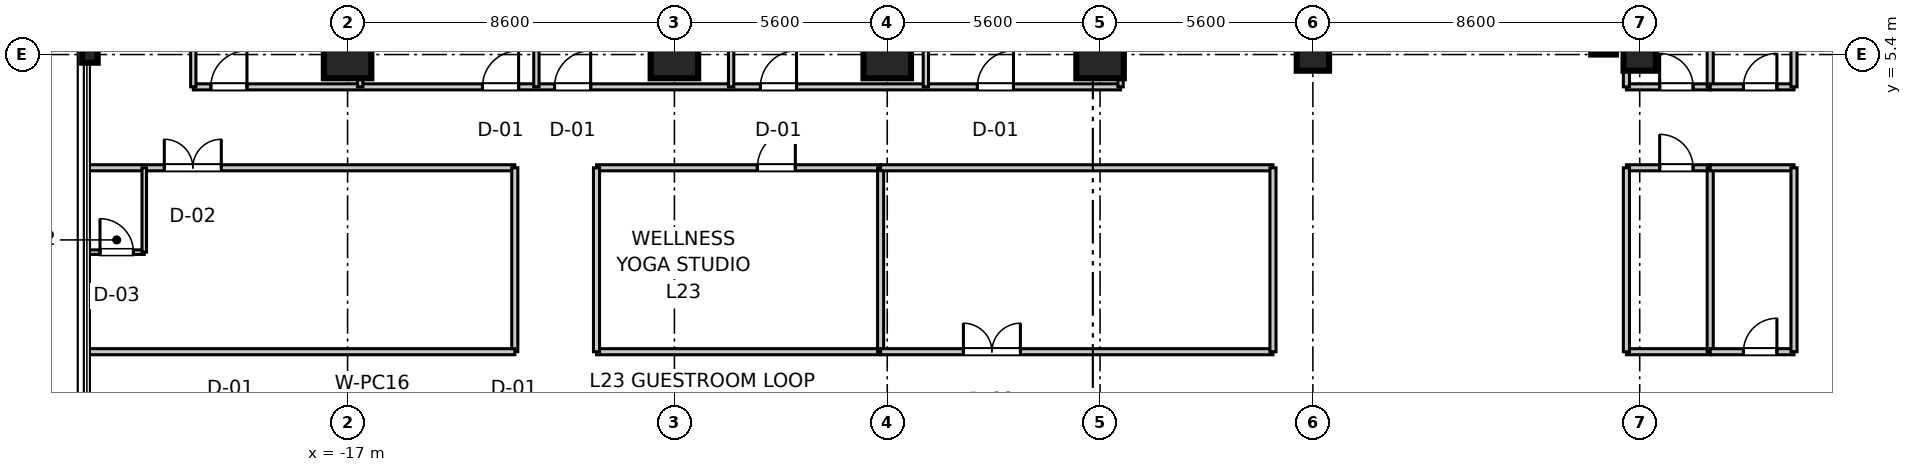
"""IFC4 building model, lengths in metres.
Left out: names, types, materials, properties, quantities, classifications, styles, units other than length and angle.
Written with IfcOpenShell. Run it as: python <this file> out.ifc"""

import sys

from ifc_helpers import new_model, si_unit, direction, frame, frame_2d, origin, origin_2d, place, context, subcontext, project, spatial, rectangle, i_section, extrude, source, transform, mapped, element, fill, save


model = new_model("IFC4")
c1 = context("Model", 3, precision=1e-05, world=origin(), true_north=direction((0.0, 1.0)))
c2 = subcontext(c1, "Body", "Model", "MODEL_VIEW")
j1 = project(units=[si_unit("LENGTHUNIT", "METRE"), si_unit("PLANEANGLEUNIT", "RADIAN")], contexts=[c1])
p1 = place(None, origin())
s1 = spatial("IfcSite", under=j1, at=p1, CompositionType="ELEMENT")
p2 = place(p1, origin())
s2 = spatial("IfcBuilding", under=s1, at=p2, CompositionType="ELEMENT")
p3 = place(p2, frame((0.0, 0.0, 95.6)))
s3 = spatial("IfcBuildingStorey", under=s2, at=p3, CompositionType="ELEMENT", Elevation=95.6)
m1 = source(origin(), c2, "Body", "SweptSolid", [
    extrude(rectangle(XDim=1.25, YDim=1.25, at=origin_2d()), origin(), (0.0, 0.0, 1.0), 3.605),
])
for number, where, z_axis, x_axis in (
    (1, (-17.0, 5.4, 0.0), (0.0, 0.0, 1.0), (1.0, 0.0, 0.0)),
    (2, (-8.4, 5.4, 0.0), (0.0, 0.0, 1.0), (1.0, 0.0, 0.0)),
    (3, (-2.8, 5.4, 0.0), (0.0, 0.0, 1.0), (1.0, 0.0, 0.0)),
    (4, (2.8, 5.4, 0.0), (0.0, 0.0, 1.0), (1.0, 0.0, 0.0)),
):
    element("IfcColumn", number, at=place(p3, frame(where, z_axis=z_axis, x_axis=x_axis)), inside=s3, PredefinedType="COLUMN", context=c2, shape_type="MappedRepresentation", body=[
        mapped(m1, transform((0.0, 0.0, 0.0), scale=1.0)),
    ])
m2 = source(origin(), c2, "Body", "SweptSolid", [
    extrude(rectangle(XDim=0.85, YDim=0.85, at=origin_2d()), origin(), (0.0, 0.0, 1.0), 3.605),
])
for number, where, z_axis, x_axis in (
    (5, (8.4, 5.4, 0.0), (0.0, 0.0, 1.0), (1.0, 0.0, 0.0)),
    (6, (17.0, 5.4, 0.0), (0.0, 0.0, 1.0), (1.0, 0.0, 0.0)),
):
    element("IfcColumn", number, at=place(p3, frame(where, z_axis=z_axis, x_axis=x_axis)), inside=s3, PredefinedType="PILASTER", context=c2, shape_type="MappedRepresentation", body=[
        mapped(m2, transform((0.0, 0.0, 0.0), scale=1.0)),
    ])
m3 = source(origin(), c2, "Body", "SweptSolid", [
    extrude(i_section(OverallWidth=0.409, OverallDepth=0.43, WebThickness=0.021, FlangeThickness=0.034, at=origin_2d()), origin(), (0.0, 0.0, 1.0), 3.605),
])
p4 = place(p3, frame((-23.78, 5.4, 0.0), z_axis=(0.0, 0.0, 1.0), x_axis=(1.0, 0.0, 0.0)))
e7 = element("IfcColumn", 7, at=p4, inside=s3, PredefinedType="COLUMN", context=c2, shape_type="MappedRepresentation", body=[
    mapped(m3, transform((0.0, 0.0, 0.0), scale=1.0)),
])
m4 = source(origin(), c2, "Body", "SweptSolid", [
    extrude(rectangle(XDim=11.6, YDim=0.65, at=frame_2d((5.8, 0.0))), origin(), (0.0, 0.0, 1.0), 3.38),
])
p5 = place(p3, frame((16.05, 5.4, 0.0), z_axis=(0.0, 0.0, 1.0), x_axis=(0.0, 1.0, 0.0)))
e8 = element("IfcWall", 8, at=p5, inside=s3, PredefinedType="SHEAR", context=c2, shape_type="MappedRepresentation", body=[
    mapped(m4, transform((0.0, 0.0, 0.0), scale=1.0)),
])
m5 = source(origin(), c2, "Body", "SweptSolid", [
    extrude(rectangle(XDim=2.205, YDim=0.16, at=frame_2d((1.103, 0.0))), origin(), (0.0, 0.0, 1.0), 2.72),
])
p6 = place(p3, frame((16.65, 4.55, 0.0), z_axis=(0.0, 0.0, 1.0), x_axis=(1.0, 0.0, 0.0)))
e9 = element("IfcWall", 9, at=p6, inside=s3, PredefinedType="PARTITIONING", context=c2, shape_type="MappedRepresentation", body=[
    mapped(m5, transform((0.0, 0.0, 0.0), scale=1.0)),
])
p7 = place(p6, frame((0.875, 0.0, 0.0)))
e10 = element("IfcOpeningElement", 10, at=p7, cuts=e9, PredefinedType="OPENING", context=c2, shape_type="SweptSolid", body=[
    extrude(rectangle(XDim=0.88, YDim=2.1, at=frame_2d((0.44, 1.05))), frame((0.0, 0.09, 0.0), z_axis=(0.0, -1.0, 0.0), x_axis=(1.0, 0.0, 0.0)), (0.0, 0.0, 1.0), 0.18),
])
m6 = source(origin(), c2, "Body", "SweptSolid", [
    extrude(rectangle(XDim=19.25, YDim=0.16, at=frame_2d((9.625, 0.0))), origin(), (0.0, 0.0, 1.0), 2.72),
])
for number, where, z_axis, x_axis in (
    (11, (16.65, 4.55, 0.0), (0.0, 0.0, 1.0), (0.0, 1.0, 0.0)),
    (12, (18.855, 4.55, 0.0), (0.0, 0.0, 1.0), (0.0, 1.0, 0.0)),
):
    element("IfcWall", number, at=place(p3, frame(where, z_axis=z_axis, x_axis=x_axis)), inside=s3, PredefinedType="PARTITIONING", context=c2, shape_type="MappedRepresentation", body=[
        mapped(m6, transform((0.0, 0.0, 0.0), scale=1.0)),
    ])
p8 = place(p3, frame((18.855, 4.55, 0.0), z_axis=(0.0, 0.0, 1.0), x_axis=(1.0, 0.0, 0.0)))
e13 = element("IfcWall", 13, at=p8, inside=s3, PredefinedType="PARTITIONING", context=c2, shape_type="MappedRepresentation", body=[
    mapped(m5, transform((0.0, 0.0, 0.0), scale=1.0)),
])
p9 = place(p8, frame((0.875, 0.0, 0.0)))
e14 = element("IfcOpeningElement", 14, at=p9, cuts=e13, PredefinedType="OPENING", context=c2, shape_type="SweptSolid", body=[
    extrude(rectangle(XDim=0.88, YDim=2.1, at=frame_2d((0.44, 1.05))), frame((0.0, 0.09, 0.0), z_axis=(0.0, -1.0, 0.0), x_axis=(1.0, 0.0, 0.0)), (0.0, 0.0, 1.0), 0.18),
])
m7 = source(origin(), c2, "Body", "SweptSolid", [
    extrude(rectangle(XDim=17.83, YDim=0.16, at=frame_2d((8.915, 0.0))), origin(), (0.0, 0.0, 1.0), 2.72),
])
p10 = place(p3, frame((21.06, 4.55, 0.0), z_axis=(0.0, 0.0, 1.0), x_axis=(0.0, 1.0, 0.0)))
e15 = element("IfcWall", 15, at=p10, inside=s3, PredefinedType="PARTITIONING", context=c2, shape_type="MappedRepresentation", body=[
    mapped(m7, transform((0.0, 0.0, 0.0), scale=1.0)),
])
m8 = source(origin(), c2, "Body", "SweptSolid", [
    extrude(rectangle(XDim=24.4, YDim=0.16, at=frame_2d((12.2, 0.0))), origin(), (0.0, 0.0, 1.0), 2.72),
])
p11 = place(p3, frame((-21.06, 4.55, 0.0), z_axis=(0.0, 0.0, 1.0), x_axis=(1.0, 0.0, 0.0)))
e16 = element("IfcWall", 16, at=p11, inside=s3, PredefinedType="PARTITIONING", context=c2, shape_type="MappedRepresentation", body=[
    mapped(m8, transform((0.0, 0.0, 0.0), scale=1.0)),
])
p12 = place(p11, frame((0.462, 0.0, 0.0)))
e17 = element("IfcOpeningElement", 17, at=p12, cuts=e16, PredefinedType="OPENING", context=c2, shape_type="SweptSolid", body=[
    extrude(rectangle(XDim=0.95, YDim=2.1, at=frame_2d((0.475, 1.05))), frame((0.0, 0.09, 0.0), z_axis=(0.0, -1.0, 0.0), x_axis=(1.0, 0.0, 0.0)), (0.0, 0.0, 1.0), 0.18),
])
p13 = place(p11, frame((7.61, 0.0, 0.0)))
e18 = element("IfcOpeningElement", 18, at=p13, cuts=e16, PredefinedType="OPENING", context=c2, shape_type="SweptSolid", body=[
    extrude(rectangle(XDim=0.95, YDim=2.1, at=frame_2d((0.475, 1.05))), frame((0.0, 0.09, 0.0), z_axis=(0.0, -1.0, 0.0), x_axis=(1.0, 0.0, 0.0)), (0.0, 0.0, 1.0), 0.18),
])
p14 = place(p11, frame((9.506, 0.0, 0.0)))
e19 = element("IfcOpeningElement", 19, at=p14, cuts=e16, PredefinedType="OPENING", context=c2, shape_type="SweptSolid", body=[
    extrude(rectangle(XDim=0.95, YDim=2.1, at=frame_2d((0.475, 1.05))), frame((0.0, 0.09, 0.0), z_axis=(0.0, -1.0, 0.0), x_axis=(1.0, 0.0, 0.0)), (0.0, 0.0, 1.0), 0.18),
])
p15 = place(p11, frame((14.923, 0.0, 0.0)))
e20 = element("IfcOpeningElement", 20, at=p15, cuts=e16, PredefinedType="OPENING", context=c2, shape_type="SweptSolid", body=[
    extrude(rectangle(XDim=0.95, YDim=2.1, at=frame_2d((0.475, 1.05))), frame((0.0, 0.09, 0.0), z_axis=(0.0, -1.0, 0.0), x_axis=(1.0, 0.0, 0.0)), (0.0, 0.0, 1.0), 0.18),
])
p16 = place(p11, frame((20.632, 0.0, 0.0)))
e21 = element("IfcOpeningElement", 21, at=p16, cuts=e16, PredefinedType="OPENING", context=c2, shape_type="SweptSolid", body=[
    extrude(rectangle(XDim=0.95, YDim=2.1, at=frame_2d((0.475, 1.05))), frame((0.0, 0.09, 0.0), z_axis=(0.0, -1.0, 0.0), x_axis=(1.0, 0.0, 0.0)), (0.0, 0.0, 1.0), 0.18),
])
m9 = source(origin(), c2, "Body", "SweptSolid", [
    extrude(rectangle(XDim=17.83, YDim=0.14, at=frame_2d((8.915, 0.0))), origin(), (0.0, 0.0, 1.0), 2.72),
])
p17 = place(p3, frame((-21.06, 4.55, 0.0), z_axis=(0.0, 0.0, 1.0), x_axis=(0.0, 1.0, 0.0)))
e22 = element("IfcWall", 22, at=p17, inside=s3, PredefinedType="PARTITIONING", context=c2, shape_type="MappedRepresentation", body=[
    mapped(m9, transform((0.0, 0.0, 0.0), scale=1.0)),
])
m10 = source(origin(), c2, "Body", "SweptSolid", [
    extrude(rectangle(XDim=19.25, YDim=0.14, at=frame_2d((9.625, 0.0))), origin(), (0.0, 0.0, 1.0), 2.72),
])
for number, where, z_axis, x_axis in (
    (23, (3.34, 4.55, 0.0), (0.0, 0.0, 1.0), (0.0, 1.0, 0.0)),
    (24, (-16.668, 4.55, 0.0), (0.0, 0.0, 1.0), (0.0, 1.0, 0.0)),
    (25, (-12.032, 4.55, 0.0), (0.0, 0.0, 1.0), (0.0, 1.0, 0.0)),
    (26, (-6.908, 4.55, 0.0), (0.0, 0.0, 1.0), (0.0, 1.0, 0.0)),
    (27, (-1.784, 4.55, 0.0), (0.0, 0.0, 1.0), (0.0, 1.0, 0.0)),
):
    element("IfcWall", number, at=place(p3, frame(where, z_axis=z_axis, x_axis=x_axis)), inside=s3, PredefinedType="PARTITIONING", context=c2, shape_type="MappedRepresentation", body=[
        mapped(m10, transform((0.0, 0.0, 0.0), scale=1.0)),
    ])
m11 = source(origin(), c2, "Body", "SweptSolid", [
    extrude(rectangle(XDim=11.2, YDim=0.16, at=frame_2d((5.6, 0.0))), origin(), (0.0, 0.0, 1.0), 2.72),
])
p18 = place(p3, frame((-23.8, 2.42, 0.0), z_axis=(0.0, 0.0, 1.0), x_axis=(1.0, 0.0, 0.0)))
e28 = element("IfcWall", 28, at=p18, inside=s3, PredefinedType="PARTITIONING", context=c2, shape_type="MappedRepresentation", body=[
    mapped(m11, transform((0.0, 0.0, 0.0), scale=1.0)),
])
p19 = place(p18, frame((1.977, 0.0, 0.0)))
e29 = element("IfcOpeningElement", 29, at=p19, cuts=e28, PredefinedType="OPENING", context=c2, shape_type="SweptSolid", body=[
    extrude(rectangle(XDim=1.5, YDim=2.15, at=frame_2d((0.75, 1.075))), frame((0.0, 0.09, 0.0), z_axis=(0.0, -1.0, 0.0), x_axis=(1.0, 0.0, 0.0)), (0.0, 0.0, 1.0), 0.18),
])
m12 = source(origin(), c2, "Body", "SweptSolid", [
    extrude(rectangle(XDim=4.84, YDim=0.16, at=frame_2d((2.42, 0.0))), origin(), (0.0, 0.0, 1.0), 2.72),
])
p20 = place(p3, frame((-12.6, -2.42, 0.0), z_axis=(0.0, 0.0, 1.0), x_axis=(0.0, 1.0, 0.0)))
e30 = element("IfcWall", 30, at=p20, inside=s3, PredefinedType="PARTITIONING", context=c2, shape_type="MappedRepresentation", body=[
    mapped(m12, transform((0.0, 0.0, 0.0), scale=1.0)),
])
p21 = place(p3, frame((-23.8, -2.42, 0.0), z_axis=(0.0, 0.0, 1.0), x_axis=(1.0, 0.0, 0.0)))
e31 = element("IfcWall", 31, at=p21, inside=s3, PredefinedType="PARTITIONING", context=c2, shape_type="MappedRepresentation", body=[
    mapped(m11, transform((0.0, 0.0, 0.0), scale=1.0)),
])
m13 = source(origin(), c2, "Body", "SweptSolid", [
    extrude(rectangle(XDim=1.45, YDim=0.12, at=frame_2d((0.725, 0.0))), origin(), (0.0, 0.0, 1.0), 2.72),
])
p22 = place(p3, frame((-23.8, 0.2, 0.0), z_axis=(0.0, 0.0, 1.0), x_axis=(1.0, 0.0, 0.0)))
e32 = element("IfcWall", 32, at=p22, inside=s3, PredefinedType="PARTITIONING", context=c2, shape_type="MappedRepresentation", body=[
    mapped(m13, transform((0.0, 0.0, 0.0), scale=1.0)),
])
p23 = place(p22, frame((0.285, 0.0, 0.0)))
e33 = element("IfcOpeningElement", 33, at=p23, cuts=e32, PredefinedType="OPENING", context=c2, shape_type="SweptSolid", body=[
    extrude(rectangle(XDim=0.88, YDim=2.1, at=frame_2d((0.44, 1.05))), frame((0.0, 0.07, 0.0), z_axis=(0.0, -1.0, 0.0), x_axis=(1.0, 0.0, 0.0)), (0.0, 0.0, 1.0), 0.14),
])
m14 = source(origin(), c2, "Body", "SweptSolid", [
    extrude(rectangle(XDim=2.22, YDim=0.12, at=frame_2d((1.11, 0.0))), origin(), (0.0, 0.0, 1.0), 2.72),
])
p24 = place(p3, frame((-22.35, 0.2, 0.0), z_axis=(0.0, 0.0, 1.0), x_axis=(0.0, 1.0, 0.0)))
e34 = element("IfcWall", 34, at=p24, inside=s3, PredefinedType="PARTITIONING", context=c2, shape_type="MappedRepresentation", body=[
    mapped(m14, transform((0.0, 0.0, 0.0), scale=1.0)),
])
m15 = source(origin(), c2, "Body", "SweptSolid", [
    extrude(rectangle(XDim=7.476, YDim=0.16, at=frame_2d((3.738, 0.0))), origin(), (0.0, 0.0, 1.0), 2.72),
])
p25 = place(p3, frame((-10.45, -2.42, 0.0), z_axis=(0.0, 0.0, 1.0), x_axis=(1.0, 0.0, 0.0)))
e35 = element("IfcWall", 35, at=p25, inside=s3, PredefinedType="PARTITIONING", context=c2, shape_type="MappedRepresentation", body=[
    mapped(m15, transform((0.0, 0.0, 0.0), scale=1.0)),
])
p26 = place(p3, frame((-10.45, 2.42, 0.0), z_axis=(0.0, 0.0, 1.0), x_axis=(1.0, 0.0, 0.0)))
e36 = element("IfcWall", 36, at=p26, inside=s3, PredefinedType="PARTITIONING", context=c2, shape_type="MappedRepresentation", body=[
    mapped(m15, transform((0.0, 0.0, 0.0), scale=1.0)),
])
p27 = place(p26, frame((4.232, 0.0, 0.0)))
e37 = element("IfcOpeningElement", 37, at=p27, cuts=e36, PredefinedType="OPENING", context=c2, shape_type="SweptSolid", body=[
    extrude(rectangle(XDim=1.0, YDim=2.1, at=frame_2d((0.5, 1.05))), frame((0.0, 0.09, 0.0), z_axis=(0.0, -1.0, 0.0), x_axis=(1.0, 0.0, 0.0)), (0.0, 0.0, 1.0), 0.18),
])
for number, where, z_axis, x_axis in (
    (38, (-10.45, -2.42, 0.0), (0.0, 0.0, 1.0), (0.0, 1.0, 0.0)),
    (39, (-2.974, -2.42, 0.0), (0.0, 0.0, 1.0), (0.0, 1.0, 0.0)),
):
    element("IfcWall", number, at=place(p3, frame(where, z_axis=z_axis, x_axis=x_axis)), inside=s3, PredefinedType="PARTITIONING", context=c2, shape_type="MappedRepresentation", body=[
        mapped(m12, transform((0.0, 0.0, 0.0), scale=1.0)),
    ])
m16 = source(origin(), c2, "Body", "SweptSolid", [
    extrude(rectangle(XDim=10.324, YDim=0.16, at=frame_2d((5.162, 0.0))), origin(), (0.0, 0.0, 1.0), 2.72),
])
p28 = place(p3, frame((-2.974, -2.42, 0.0), z_axis=(0.0, 0.0, 1.0), x_axis=(1.0, 0.0, 0.0)))
e40 = element("IfcWall", 40, at=p28, inside=s3, PredefinedType="PARTITIONING", context=c2, shape_type="MappedRepresentation", body=[
    mapped(m16, transform((0.0, 0.0, 0.0), scale=1.0)),
])
p29 = place(p28, frame((2.178, 0.0, 0.0)))
e41 = element("IfcOpeningElement", 41, at=p29, cuts=e40, PredefinedType="OPENING", context=c2, shape_type="SweptSolid", body=[
    extrude(rectangle(XDim=1.5, YDim=2.15, at=frame_2d((0.75, 1.075))), frame((0.0, 0.09, 0.0), z_axis=(0.0, -1.0, 0.0), x_axis=(1.0, 0.0, 0.0)), (0.0, 0.0, 1.0), 0.18),
])
p30 = place(p3, frame((-2.974, 2.42, 0.0), z_axis=(0.0, 0.0, 1.0), x_axis=(1.0, 0.0, 0.0)))
e42 = element("IfcWall", 42, at=p30, inside=s3, PredefinedType="PARTITIONING", context=c2, shape_type="MappedRepresentation", body=[
    mapped(m16, transform((0.0, 0.0, 0.0), scale=1.0)),
])
p31 = place(p3, frame((7.35, -2.42, 0.0), z_axis=(0.0, 0.0, 1.0), x_axis=(0.0, 1.0, 0.0)))
e43 = element("IfcWall", 43, at=p31, inside=s3, PredefinedType="PARTITIONING", context=c2, shape_type="MappedRepresentation", body=[
    mapped(m12, transform((0.0, 0.0, 0.0), scale=1.0)),
])
p32 = place(p3, frame((16.65, -2.42, 0.0), z_axis=(0.0, 0.0, 1.0), x_axis=(1.0, 0.0, 0.0)))
e44 = element("IfcWall", 44, at=p32, inside=s3, PredefinedType="PARTITIONING", context=c2, shape_type="MappedRepresentation", body=[
    mapped(m5, transform((0.0, 0.0, 0.0), scale=1.0)),
])
p33 = place(p3, frame((16.65, 2.42, 0.0), z_axis=(0.0, 0.0, 1.0), x_axis=(1.0, 0.0, 0.0)))
e45 = element("IfcWall", 45, at=p33, inside=s3, PredefinedType="PARTITIONING", context=c2, shape_type="MappedRepresentation", body=[
    mapped(m5, transform((0.0, 0.0, 0.0), scale=1.0)),
])
p34 = place(p33, frame((0.875, 0.0, 0.0)))
e46 = element("IfcOpeningElement", 46, at=p34, cuts=e45, PredefinedType="OPENING", context=c2, shape_type="SweptSolid", body=[
    extrude(rectangle(XDim=0.88, YDim=2.1, at=frame_2d((0.44, 1.05))), frame((0.0, 0.09, 0.0), z_axis=(0.0, -1.0, 0.0), x_axis=(1.0, 0.0, 0.0)), (0.0, 0.0, 1.0), 0.18),
])
for number, where, z_axis, x_axis in (
    (47, (16.65, -2.42, 0.0), (0.0, 0.0, 1.0), (0.0, 1.0, 0.0)),
    (48, (18.855, -2.42, 0.0), (0.0, 0.0, 1.0), (0.0, 1.0, 0.0)),
):
    element("IfcWall", number, at=place(p3, frame(where, z_axis=z_axis, x_axis=x_axis)), inside=s3, PredefinedType="PARTITIONING", context=c2, shape_type="MappedRepresentation", body=[
        mapped(m12, transform((0.0, 0.0, 0.0), scale=1.0)),
    ])
p35 = place(p3, frame((18.855, -2.42, 0.0), z_axis=(0.0, 0.0, 1.0), x_axis=(1.0, 0.0, 0.0)))
e49 = element("IfcWall", 49, at=p35, inside=s3, PredefinedType="PARTITIONING", context=c2, shape_type="MappedRepresentation", body=[
    mapped(m5, transform((0.0, 0.0, 0.0), scale=1.0)),
])
p36 = place(p35, frame((0.875, 0.0, 0.0)))
e50 = element("IfcOpeningElement", 50, at=p36, cuts=e49, PredefinedType="OPENING", context=c2, shape_type="SweptSolid", body=[
    extrude(rectangle(XDim=0.88, YDim=2.1, at=frame_2d((0.44, 1.05))), frame((0.0, 0.09, 0.0), z_axis=(0.0, -1.0, 0.0), x_axis=(1.0, 0.0, 0.0)), (0.0, 0.0, 1.0), 0.18),
])
p37 = place(p3, frame((18.855, 2.42, 0.0), z_axis=(0.0, 0.0, 1.0), x_axis=(1.0, 0.0, 0.0)))
e51 = element("IfcWall", 51, at=p37, inside=s3, PredefinedType="PARTITIONING", context=c2, shape_type="MappedRepresentation", body=[
    mapped(m5, transform((0.0, 0.0, 0.0), scale=1.0)),
])
p38 = place(p3, frame((21.06, -2.42, 0.0), z_axis=(0.0, 0.0, 1.0), x_axis=(0.0, 1.0, 0.0)))
e52 = element("IfcWall", 52, at=p38, inside=s3, PredefinedType="PARTITIONING", context=c2, shape_type="MappedRepresentation", body=[
    mapped(m12, transform((0.0, 0.0, 0.0), scale=1.0)),
])
m17 = source(origin(), c2, "Body", "SweptSolid", [
    extrude(rectangle(XDim=0.88, YDim=2.1, at=frame_2d((0.44, 1.05))), frame((0.0, 0.025, 0.0), z_axis=(0.0, -1.0, 0.0), x_axis=(1.0, 0.0, 0.0)), (0.0, 0.0, 1.0), 0.05),
])
p39 = place(p7, origin())
e53 = element("IfcDoor", 53, at=p39, inside=s3, OperationType="SINGLE_SWING_LEFT", PredefinedType="DOOR", context=c2, shape_type="MappedRepresentation", body=[
    mapped(m17, transform((0.0, 0.0, 0.0), scale=1.0)),
])
fill(e10, e53)
p40 = place(p9, origin())
e54 = element("IfcDoor", 54, at=p40, inside=s3, OperationType="SINGLE_SWING_RIGHT", PredefinedType="DOOR", context=c2, shape_type="MappedRepresentation", body=[
    mapped(m17, transform((0.0, 0.0, 0.0), scale=1.0)),
])
fill(e14, e54)
m18 = source(origin(), c2, "Body", "SweptSolid", [
    extrude(rectangle(XDim=0.95, YDim=2.1, at=frame_2d((0.475, 1.05))), frame((0.0, 0.025, 0.0), z_axis=(0.0, -1.0, 0.0), x_axis=(1.0, 0.0, 0.0)), (0.0, 0.0, 1.0), 0.05),
])
p41 = place(p12, origin())
e55 = element("IfcDoor", 55, at=p41, inside=s3, OperationType="SINGLE_SWING_RIGHT", PredefinedType="DOOR", context=c2, shape_type="MappedRepresentation", body=[
    mapped(m18, transform((0.0, 0.0, 0.0), scale=1.0)),
])
fill(e17, e55)
p42 = place(p13, origin())
e56 = element("IfcDoor", 56, at=p42, inside=s3, OperationType="SINGLE_SWING_RIGHT", PredefinedType="DOOR", context=c2, shape_type="MappedRepresentation", body=[
    mapped(m18, transform((0.0, 0.0, 0.0), scale=1.0)),
])
fill(e18, e56)
p43 = place(p14, origin())
e57 = element("IfcDoor", 57, at=p43, inside=s3, OperationType="SINGLE_SWING_RIGHT", PredefinedType="DOOR", context=c2, shape_type="MappedRepresentation", body=[
    mapped(m18, transform((0.0, 0.0, 0.0), scale=1.0)),
])
fill(e19, e57)
p44 = place(p15, origin())
e58 = element("IfcDoor", 58, at=p44, inside=s3, OperationType="SINGLE_SWING_RIGHT", PredefinedType="DOOR", context=c2, shape_type="MappedRepresentation", body=[
    mapped(m18, transform((0.0, 0.0, 0.0), scale=1.0)),
])
fill(e20, e58)
p45 = place(p16, origin())
e59 = element("IfcDoor", 59, at=p45, inside=s3, OperationType="SINGLE_SWING_RIGHT", PredefinedType="DOOR", context=c2, shape_type="MappedRepresentation", body=[
    mapped(m18, transform((0.0, 0.0, 0.0), scale=1.0)),
])
fill(e21, e59)
p46 = place(p23, origin())
e60 = element("IfcDoor", 60, at=p46, inside=s3, OperationType="SINGLE_SWING_LEFT", PredefinedType="DOOR", context=c2, shape_type="MappedRepresentation", body=[
    mapped(m17, transform((0.0, 0.0, 0.0), scale=1.0)),
])
fill(e33, e60)
m19 = source(origin(), c2, "Body", "SweptSolid", [
    extrude(rectangle(XDim=1.5, YDim=2.15, at=frame_2d((0.75, 1.075))), frame((0.0, 0.025, 0.0), z_axis=(0.0, -1.0, 0.0), x_axis=(1.0, 0.0, 0.0)), (0.0, 0.0, 1.0), 0.05),
])
p47 = place(p19, origin())
e61 = element("IfcDoor", 61, at=p47, inside=s3, OperationType="DOUBLE_DOOR_SINGLE_SWING", PredefinedType="DOOR", context=c2, shape_type="MappedRepresentation", body=[
    mapped(m19, transform((0.0, 0.0, 0.0), scale=1.0)),
])
fill(e29, e61)
m20 = source(origin(), c2, "Body", "SweptSolid", [
    extrude(rectangle(XDim=1.0, YDim=2.1, at=frame_2d((0.5, 1.05))), frame((0.0, 0.025, 0.0), z_axis=(0.0, -1.0, 0.0), x_axis=(1.0, 0.0, 0.0)), (0.0, 0.0, 1.0), 0.05),
])
p48 = place(p27, frame((1.0, 0.0, 0.0), z_axis=(0.0, 0.0, 1.0), x_axis=(-1.0, 0.0, 0.0)))
e62 = element("IfcDoor", 62, at=p48, inside=s3, OperationType="SINGLE_SWING_RIGHT", PredefinedType="DOOR", context=c2, shape_type="MappedRepresentation", body=[
    mapped(m20, transform((0.0, 0.0, 0.0), scale=1.0)),
])
fill(e37, e62)
p49 = place(p29, origin())
e63 = element("IfcDoor", 63, at=p49, inside=s3, OperationType="DOUBLE_DOOR_SINGLE_SWING", PredefinedType="DOOR", context=c2, shape_type="MappedRepresentation", body=[
    mapped(m19, transform((0.0, 0.0, 0.0), scale=1.0)),
])
fill(e41, e63)
p50 = place(p34, frame((0.88, 0.0, 0.0), z_axis=(0.0, 0.0, 1.0), x_axis=(-1.0, 0.0, 0.0)))
e64 = element("IfcDoor", 64, at=p50, inside=s3, OperationType="SINGLE_SWING_LEFT", PredefinedType="DOOR", context=c2, shape_type="MappedRepresentation", body=[
    mapped(m17, transform((0.0, 0.0, 0.0), scale=1.0)),
])
fill(e46, e64)
p51 = place(p36, origin())
e65 = element("IfcDoor", 65, at=p51, inside=s3, OperationType="SINGLE_SWING_RIGHT", PredefinedType="DOOR", context=c2, shape_type="MappedRepresentation", body=[
    mapped(m17, transform((0.0, 0.0, 0.0), scale=1.0)),
])
fill(e50, e65)
save(model, sys.argv[1])
